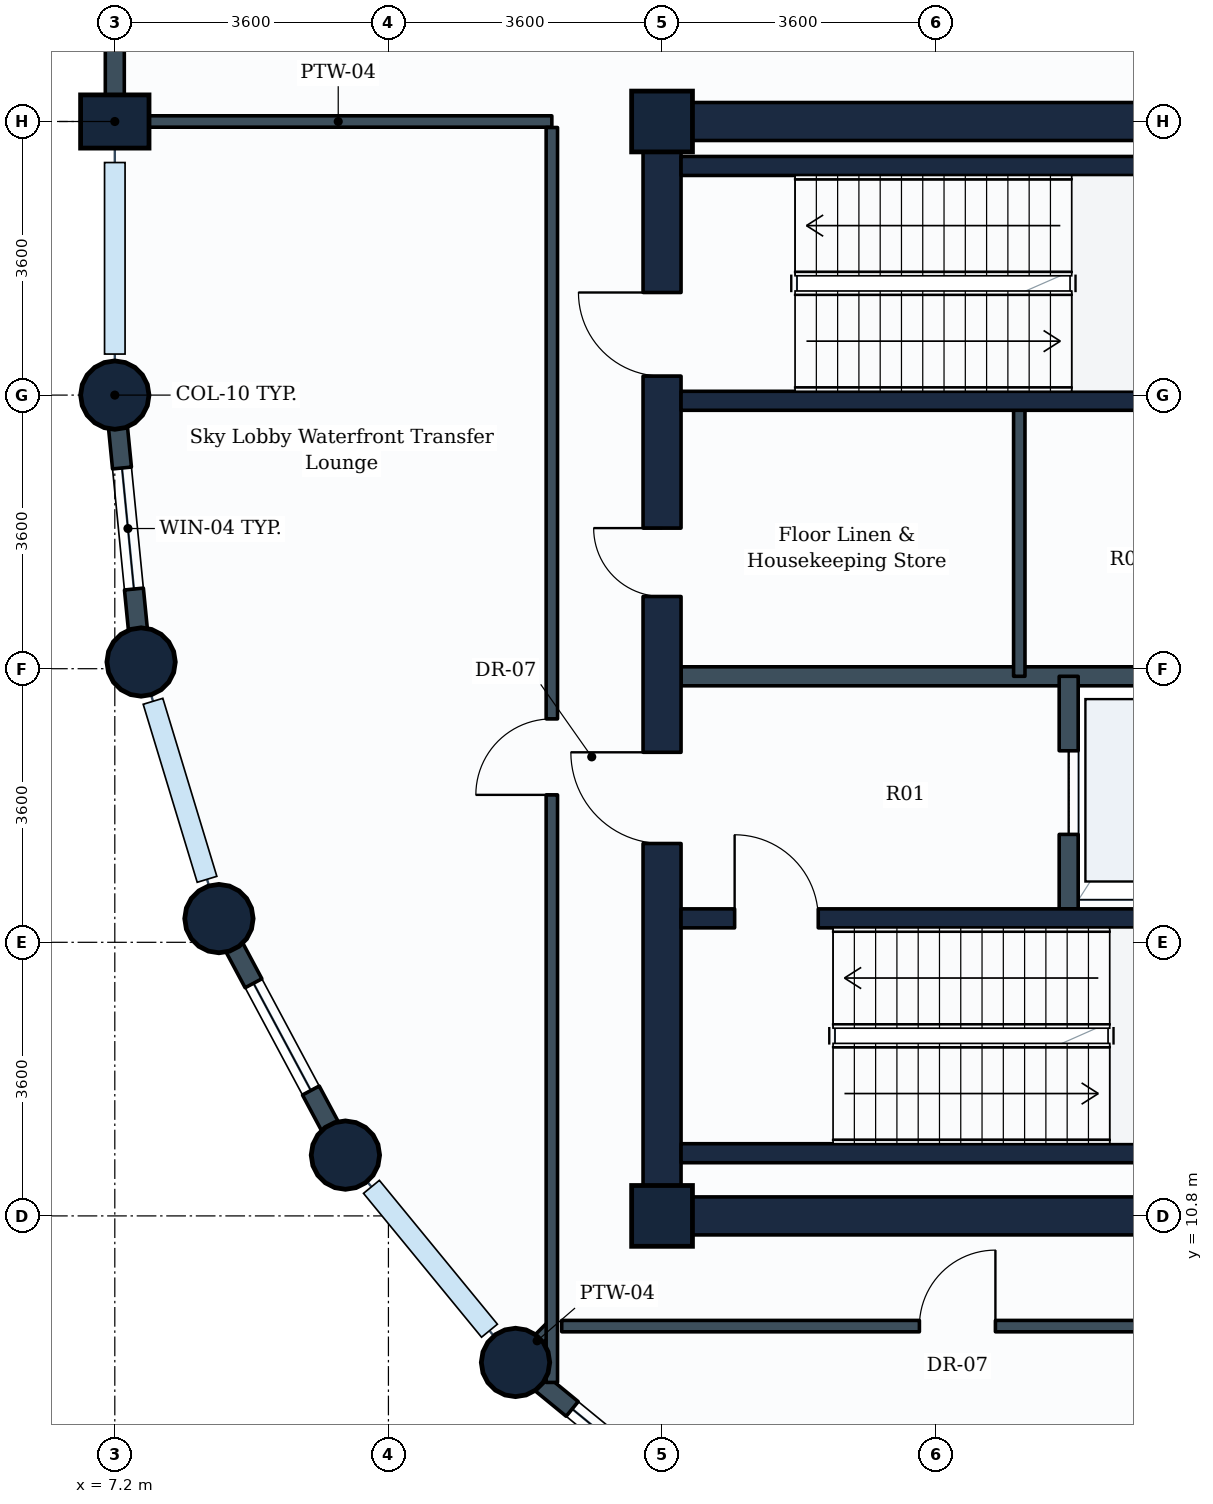
"""IFC4 building model, lengths in metres.
Left out: names, types, materials, properties, quantities, classifications, styles, units other than length and angle.
Written with IfcOpenShell. Run it as: python <this file> out.ifc"""

import sys

from ifc_helpers import new_model, si_unit, direction, frame, frame_2d, origin, origin_2d, place, context, subcontext, project, spatial, rectangle, circle, extrude, element, fill, save


model = new_model("IFC4")
c1 = context("Model", 3, precision=1e-05, world=origin(), true_north=direction((0.0, 1.0)))
c2 = subcontext(c1, "Body", "Model", "MODEL_VIEW")
j1 = project(units=[si_unit("LENGTHUNIT", "METRE"), si_unit("PLANEANGLEUNIT", "RADIAN")], contexts=[c1])
p1 = place(None, origin())
s1 = spatial("IfcSite", under=j1, at=p1, CompositionType="ELEMENT")
p2 = place(p1, origin())
s2 = spatial("IfcBuilding", under=s1, at=p2, CompositionType="ELEMENT")
p3 = place(p2, frame((0.0, 0.0, 209.0)))
s3 = spatial("IfcBuildingStorey", under=s2, at=p3, CompositionType="ELEMENT", Elevation=209.0)
p4 = place(p3, frame((7.2, 21.6, 0.0), z_axis=(0.0, 0.0, 1.0), x_axis=(1.0, 0.0, 0.0)))
e1 = element("IfcColumn", 1, at=p4, inside=s3, PredefinedType="COLUMN", context=c2, shape_type="SweptSolid", body=[
    extrude(circle(Radius=0.45, at=origin_2d()), origin(), (0.0, 0.0, 1.0), 4.8),
])
p5 = place(p3, frame((7.2, 25.2, 0.0), z_axis=(0.0, 0.0, 1.0), x_axis=(0.0, 1.0, 0.0)))
e2 = element("IfcColumn", 2, at=p5, inside=s3, PredefinedType="COLUMN", context=c2, shape_type="SweptSolid", body=[
    extrude(rectangle(XDim=0.7, YDim=0.9, at=origin_2d()), origin(), (0.0, 0.0, 1.0), 4.8),
])
for number, where, z_axis, x_axis in (
    (3, (7.546, 18.088, 0.0), (0.0, 0.0, 1.0), (1.0, 0.0, 0.0)),
    (4, (8.57, 14.712, 0.0), (0.0, 0.0, 1.0), (1.0, 0.0, 0.0)),
    (5, (10.234, 11.6, 0.0), (0.0, 0.0, 1.0), (1.0, 0.0, 0.0)),
    (6, (12.472, 8.872, 0.0), (0.0, 0.0, 1.0), (1.0, 0.0, 0.0)),
):
    element("IfcColumn", number, at=place(p3, frame(where, z_axis=z_axis, x_axis=x_axis)), inside=s3, PredefinedType="COLUMN", context=c2, shape_type="SweptSolid", body=[
        extrude(circle(Radius=0.45, at=origin_2d()), origin(), (0.0, 0.0, 1.0), 4.8),
    ])
for number, where, z_axis, x_axis in (
    (7, (14.4, 10.8, 0.0), (0.0, 0.0, 1.0), (1.0, 0.0, 0.0)),
    (8, (14.4, 25.2, 0.0), (0.0, 0.0, 1.0), (1.0, 0.0, 0.0)),
):
    element("IfcColumn", number, at=place(p3, frame(where, z_axis=z_axis, x_axis=x_axis)), inside=s3, PredefinedType="COLUMN", context=c2, shape_type="SweptSolid", body=[
        extrude(rectangle(XDim=0.8, YDim=0.8, at=origin_2d()), origin(), (0.0, 0.0, 1.0), 4.8),
    ])
p6 = place(p3, frame((7.2, 25.2, 0.0), z_axis=(0.0, 0.0, 1.0), x_axis=(0.0, 1.0, 0.0)))
e9 = element("IfcWall", 9, at=p6, inside=s3, PredefinedType="STANDARD", context=c2, shape_type="SweptSolid", body=[
    extrude(rectangle(XDim=3.6, YDim=0.25, at=frame_2d((1.8, 0.0))), origin(), (0.0, 0.0, 1.0), 3.93),
])
p7 = place(p3, frame((7.546, 18.088, 0.0), z_axis=(0.0, 0.0, 1.0), x_axis=(-0.09802417461, 0.995184033831, 0.0)))
e10 = element("IfcWall", 10, at=p7, inside=s3, PredefinedType="STANDARD", context=c2, shape_type="SweptSolid", body=[
    extrude(rectangle(XDim=3.529, YDim=0.25, at=frame_2d((1.765, 0.0))), origin(), (0.0, 0.0, 1.0), 3.93),
])
p8 = place(p7, frame((0.965, 0.0, 0.85)))
e11 = element("IfcOpeningElement", 11, at=p8, cuts=e10, PredefinedType="OPENING", context=c2, shape_type="SweptSolid", body=[
    extrude(rectangle(XDim=1.6, YDim=1.35, at=frame_2d((0.8, 0.675))), frame((0.0, 0.135, 0.0), z_axis=(0.0, -1.0, 0.0), x_axis=(1.0, 0.0, 0.0)), (0.0, 0.0, 1.0), 0.27),
])
p9 = place(p3, frame((10.234, 11.6, 0.0), z_axis=(0.0, 0.0, 1.0), x_axis=(-0.47151087309, 0.881860247748, 0.0)))
e12 = element("IfcWall", 12, at=p9, inside=s3, PredefinedType="STANDARD", context=c2, shape_type="SweptSolid", body=[
    extrude(rectangle(XDim=3.529, YDim=0.25, at=frame_2d((1.764, 0.0))), origin(), (0.0, 0.0, 1.0), 3.93),
])
p10 = place(p9, frame((0.964, 0.0, 0.85)))
e13 = element("IfcOpeningElement", 13, at=p10, cuts=e12, PredefinedType="OPENING", context=c2, shape_type="SweptSolid", body=[
    extrude(rectangle(XDim=1.6, YDim=1.35, at=frame_2d((0.8, 0.675))), frame((0.0, 0.135, 0.0), z_axis=(0.0, -1.0, 0.0), x_axis=(1.0, 0.0, 0.0)), (0.0, 0.0, 1.0), 0.27),
])
p11 = place(p3, frame((15.2, 6.634, 0.0), z_axis=(0.0, 0.0, 1.0), x_axis=(-0.773121216285, 0.634258295121, 0.0)))
e14 = element("IfcWall", 14, at=p11, inside=s3, PredefinedType="STANDARD", context=c2, shape_type="SweptSolid", body=[
    extrude(rectangle(XDim=3.529, YDim=0.25, at=frame_2d((1.764, 0.0))), origin(), (0.0, 0.0, 1.0), 3.93),
])
p12 = place(p11, frame((0.964, 0.0, 0.85)))
e15 = element("IfcOpeningElement", 15, at=p12, cuts=e14, PredefinedType="OPENING", context=c2, shape_type="SweptSolid", body=[
    extrude(rectangle(XDim=1.6, YDim=1.35, at=frame_2d((0.8, 0.675))), frame((0.0, 0.135, 0.0), z_axis=(0.0, -1.0, 0.0), x_axis=(1.0, 0.0, 0.0)), (0.0, 0.0, 1.0), 0.27),
])
p13 = place(p3, frame((14.4, 10.8, 0.0), z_axis=(0.0, 0.0, 1.0), x_axis=(1.0, 0.0, 0.0)))
e16 = element("IfcWall", 16, at=p13, inside=s3, PredefinedType="SHEAR", context=c2, shape_type="SweptSolid", body=[
    extrude(rectangle(XDim=18.0, YDim=0.5, at=frame_2d((9.0, 0.0))), origin(), (0.0, 0.0, 1.0), 4.55),
])
p14 = place(p3, frame((14.4, 25.2, 0.0), z_axis=(0.0, 0.0, 1.0), x_axis=(1.0, 0.0, 0.0)))
e17 = element("IfcWall", 17, at=p14, inside=s3, PredefinedType="SHEAR", context=c2, shape_type="SweptSolid", body=[
    extrude(rectangle(XDim=10.8, YDim=0.5, at=frame_2d((5.4, 0.0))), origin(), (0.0, 0.0, 1.0), 4.55),
])
p15 = place(p3, frame((14.4, 10.8, 0.0), z_axis=(0.0, 0.0, 1.0), x_axis=(0.0, 1.0, 0.0)))
e18 = element("IfcWall", 18, at=p15, inside=s3, PredefinedType="SHEAR", context=c2, shape_type="SweptSolid", body=[
    extrude(rectangle(XDim=14.4, YDim=0.5, at=frame_2d((7.2, 0.0))), origin(), (0.0, 0.0, 1.0), 4.55),
])
p16 = place(p15, frame((11.05, 0.0, 0.0)))
e19 = element("IfcOpeningElement", 19, at=p16, cuts=e18, PredefinedType="OPENING", context=c2, shape_type="SweptSolid", body=[
    extrude(rectangle(XDim=1.1, YDim=2.1, at=frame_2d((0.55, 1.05))), frame((0.0, 0.26, 0.0), z_axis=(0.0, -1.0, 0.0), x_axis=(1.0, 0.0, 0.0)), (0.0, 0.0, 1.0), 0.52),
])
p17 = place(p15, frame((4.9, 0.0, 0.0)))
e20 = element("IfcOpeningElement", 20, at=p17, cuts=e18, PredefinedType="OPENING", context=c2, shape_type="SweptSolid", body=[
    extrude(rectangle(XDim=1.2, YDim=2.1, at=frame_2d((0.6, 1.05))), frame((0.0, 0.26, 0.0), z_axis=(0.0, -1.0, 0.0), x_axis=(1.0, 0.0, 0.0)), (0.0, 0.0, 1.0), 0.52),
])
p18 = place(p15, frame((8.15, 0.0, 0.0)))
e21 = element("IfcOpeningElement", 21, at=p18, cuts=e18, PredefinedType="OPENING", context=c2, shape_type="SweptSolid", body=[
    extrude(rectangle(XDim=0.9, YDim=2.1, at=frame_2d((0.45, 1.05))), frame((0.0, 0.26, 0.0), z_axis=(0.0, -1.0, 0.0), x_axis=(1.0, 0.0, 0.0)), (0.0, 0.0, 1.0), 0.52),
])
p19 = place(p3, frame((14.65, 11.625, 0.0), z_axis=(0.0, 0.0, 1.0), x_axis=(1.0, 0.0, 0.0)))
e22 = element("IfcWall", 22, at=p19, inside=s3, PredefinedType="SHEAR", context=c2, shape_type="SweptSolid", body=[
    extrude(rectangle(XDim=8.7, YDim=0.25, at=frame_2d((4.35, 0.0))), origin(), (0.0, 0.0, 1.0), 4.55),
])
p20 = place(p3, frame((14.65, 14.715, 0.0), z_axis=(0.0, 0.0, 1.0), x_axis=(1.0, 0.0, 0.0)))
e23 = element("IfcWall", 23, at=p20, inside=s3, PredefinedType="SHEAR", context=c2, shape_type="SweptSolid", body=[
    extrude(rectangle(XDim=8.7, YDim=0.25, at=frame_2d((4.35, 0.0))), origin(), (0.0, 0.0, 1.0), 4.55),
])
p21 = place(p20, frame((0.705, 0.0, 0.0)))
e24 = element("IfcOpeningElement", 24, at=p21, cuts=e23, PredefinedType="OPENING", context=c2, shape_type="SweptSolid", body=[
    extrude(rectangle(XDim=1.1, YDim=2.1, at=frame_2d((0.55, 1.05))), frame((0.0, 0.135, 0.0), z_axis=(0.0, -1.0, 0.0), x_axis=(1.0, 0.0, 0.0)), (0.0, 0.0, 1.0), 0.27),
])
for number, where, z_axis, x_axis in (
    (25, (14.65, 21.525, 0.0), (0.0, 0.0, 1.0), (1.0, 0.0, 0.0)),
    (26, (14.65, 24.615, 0.0), (0.0, 0.0, 1.0), (1.0, 0.0, 0.0)),
):
    element("IfcWall", number, at=place(p3, frame(where, z_axis=z_axis, x_axis=x_axis)), inside=s3, PredefinedType="SHEAR", context=c2, shape_type="SweptSolid", body=[
        extrude(rectangle(XDim=8.25, YDim=0.25, at=frame_2d((4.125, 0.0))), origin(), (0.0, 0.0, 1.0), 4.55),
    ])
p22 = place(p3, frame((14.65, 17.9, 0.0), z_axis=(0.0, 0.0, 1.0), x_axis=(1.0, 0.0, 0.0)))
e27 = element("IfcWall", 27, at=p22, inside=s3, PredefinedType="PARTITIONING", context=c2, shape_type="SweptSolid", body=[
    extrude(rectangle(XDim=7.15, YDim=0.25, at=frame_2d((3.575, 0.0))), origin(), (0.0, 0.0, 1.0), 4.535),
])
p23 = place(p3, frame((19.75, 14.84, 0.0), z_axis=(0.0, 0.0, 1.0), x_axis=(0.0, 1.0, 0.0)))
e28 = element("IfcWall", 28, at=p23, inside=s3, PredefinedType="PARTITIONING", context=c2, shape_type="SweptSolid", body=[
    extrude(rectangle(XDim=3.06, YDim=0.25, at=frame_2d((1.53, 0.0))), origin(), (0.0, 0.0, 1.0), 4.535),
])
p24 = place(p23, frame((0.98, 0.0, 0.0)))
e29 = element("IfcOpeningElement", 29, at=p24, cuts=e28, PredefinedType="OPENING", context=c2, shape_type="SweptSolid", body=[
    extrude(rectangle(XDim=1.1, YDim=2.1, at=frame_2d((0.55, 1.05))), frame((0.0, 0.135, 0.0), z_axis=(0.0, -1.0, 0.0), x_axis=(1.0, 0.0, 0.0)), (0.0, 0.0, 1.0), 0.27),
])
p25 = place(p3, frame((19.1, 17.9, 0.0), z_axis=(0.0, 0.0, 1.0), x_axis=(0.0, 1.0, 0.0)))
e30 = element("IfcWall", 30, at=p25, inside=s3, PredefinedType="PARTITIONING", context=c2, shape_type="SweptSolid", body=[
    extrude(rectangle(XDim=3.625, YDim=0.15, at=frame_2d((1.812, 0.0))), origin(), (0.0, 0.0, 1.0), 4.535),
])
p26 = place(p3, frame((7.329, 25.2, 0.0), z_axis=(0.0, 0.0, 1.0), x_axis=(1.0, 0.0, 0.0)))
e31 = element("IfcWall", 31, at=p26, inside=s3, PredefinedType="PARTITIONING", context=c2, shape_type="SweptSolid", body=[
    extrude(rectangle(XDim=5.621, YDim=0.15, at=frame_2d((2.811, 0.0))), origin(), (0.0, 0.0, 1.0), 4.535),
])
p27 = place(p3, frame((12.95, 9.35, 0.0), z_axis=(0.0, 0.0, 1.0), x_axis=(-0.706883613527, -0.707329878435, 0.0)))
e32 = element("IfcWall", 32, at=p27, inside=s3, PredefinedType="PARTITIONING", context=c2, shape_type="SweptSolid", body=[
    extrude(rectangle(XDim=0.547, YDim=0.15, at=frame_2d((0.273, 0.0))), origin(), (0.0, 0.0, 1.0), 4.26),
])
p28 = place(p3, frame((12.95, 8.609, 0.0), z_axis=(0.0, 0.0, 1.0), x_axis=(0.0, 1.0, 0.0)))
e33 = element("IfcWall", 33, at=p28, inside=s3, PredefinedType="PARTITIONING", context=c2, shape_type="SweptSolid", body=[
    extrude(rectangle(XDim=16.512, YDim=0.15, at=frame_2d((8.256, 0.0))), origin(), (0.0, 0.0, 1.0), 3.93),
])
p29 = place(p28, frame((7.731, 0.0, 0.0)))
e34 = element("IfcOpeningElement", 34, at=p29, cuts=e33, PredefinedType="OPENING", context=c2, shape_type="SweptSolid", body=[
    extrude(rectangle(XDim=1.0, YDim=2.1, at=frame_2d((0.5, 1.05))), frame((0.0, 0.085, 0.0), z_axis=(0.0, -1.0, 0.0), x_axis=(1.0, 0.0, 0.0)), (0.0, 0.0, 1.0), 0.17),
])
p30 = place(p3, frame((13.08, 9.35, 0.0), z_axis=(0.0, 0.0, 1.0), x_axis=(1.0, 0.0, 0.0)))
e35 = element("IfcWall", 35, at=p30, inside=s3, PredefinedType="PARTITIONING", context=c2, shape_type="SweptSolid", body=[
    extrude(rectangle(XDim=15.641, YDim=0.15, at=frame_2d((7.82, 0.0))), origin(), (0.0, 0.0, 1.0), 4.22),
])
p31 = place(p30, frame((4.706, 0.0, 0.0)))
e36 = element("IfcOpeningElement", 36, at=p31, cuts=e35, PredefinedType="OPENING", context=c2, shape_type="SweptSolid", body=[
    extrude(rectangle(XDim=1.0, YDim=2.1, at=frame_2d((0.5, 1.05))), frame((0.0, 0.085, 0.0), z_axis=(0.0, -1.0, 0.0), x_axis=(1.0, 0.0, 0.0)), (0.0, 0.0, 1.0), 0.17),
])
p32 = place(p8, origin())
e37 = element("IfcWindow", 37, at=p32, inside=s3, PartitioningType="SINGLE_PANEL", PredefinedType="WINDOW", context=c2, shape_type="SweptSolid", body=[
    extrude(rectangle(XDim=1.6, YDim=1.35, at=frame_2d((0.8, 0.675))), frame((0.0, 0.03, 0.0), z_axis=(0.0, -1.0, 0.0), x_axis=(1.0, 0.0, 0.0)), (0.0, 0.0, 1.0), 0.06),
])
fill(e11, e37)
p33 = place(p10, origin())
e38 = element("IfcWindow", 38, at=p33, inside=s3, PartitioningType="SINGLE_PANEL", PredefinedType="WINDOW", context=c2, shape_type="SweptSolid", body=[
    extrude(rectangle(XDim=1.6, YDim=1.35, at=frame_2d((0.8, 0.675))), frame((0.0, 0.03, 0.0), z_axis=(0.0, -1.0, 0.0), x_axis=(1.0, 0.0, 0.0)), (0.0, 0.0, 1.0), 0.06),
])
fill(e13, e38)
p34 = place(p12, origin())
e39 = element("IfcWindow", 39, at=p34, inside=s3, PartitioningType="SINGLE_PANEL", PredefinedType="WINDOW", context=c2, shape_type="SweptSolid", body=[
    extrude(rectangle(XDim=1.6, YDim=1.35, at=frame_2d((0.8, 0.675))), frame((0.0, 0.03, 0.0), z_axis=(0.0, -1.0, 0.0), x_axis=(1.0, 0.0, 0.0)), (0.0, 0.0, 1.0), 0.06),
])
fill(e15, e39)
p35 = place(p21, origin())
e40 = element("IfcDoor", 40, at=p35, inside=s3, OperationType="SINGLE_SWING_LEFT", PredefinedType="DOOR", context=c2, shape_type="SweptSolid", body=[
    extrude(rectangle(XDim=1.1, YDim=2.1, at=frame_2d((0.55, 1.05))), frame((0.0, 0.025, 0.0), z_axis=(0.0, -1.0, 0.0), x_axis=(1.0, 0.0, 0.0)), (0.0, 0.0, 1.0), 0.05),
])
fill(e24, e40)
p36 = place(p16, origin())
e41 = element("IfcDoor", 41, at=p36, inside=s3, OperationType="SINGLE_SWING_RIGHT", PredefinedType="DOOR", context=c2, shape_type="SweptSolid", body=[
    extrude(rectangle(XDim=1.1, YDim=2.1, at=frame_2d((0.55, 1.05))), frame((0.0, 0.025, 0.0), z_axis=(0.0, -1.0, 0.0), x_axis=(1.0, 0.0, 0.0)), (0.0, 0.0, 1.0), 0.05),
])
fill(e19, e41)
p37 = place(p24, origin())
e42 = element("IfcDoor", 42, at=p37, inside=s3, OperationType="SLIDING_TO_LEFT", PredefinedType="DOOR", context=c2, shape_type="SweptSolid", body=[
    extrude(rectangle(XDim=1.1, YDim=2.1, at=frame_2d((0.55, 1.05))), frame((0.0, 0.025, 0.0), z_axis=(0.0, -1.0, 0.0), x_axis=(1.0, 0.0, 0.0)), (0.0, 0.0, 1.0), 0.05),
])
fill(e29, e42)
p38 = place(p17, origin())
e43 = element("IfcDoor", 43, at=p38, inside=s3, OperationType="SINGLE_SWING_RIGHT", PredefinedType="DOOR", context=c2, shape_type="SweptSolid", body=[
    extrude(rectangle(XDim=1.2, YDim=2.1, at=frame_2d((0.6, 1.05))), frame((0.0, 0.025, 0.0), z_axis=(0.0, -1.0, 0.0), x_axis=(1.0, 0.0, 0.0)), (0.0, 0.0, 1.0), 0.05),
])
fill(e20, e43)
p39 = place(p18, origin())
e44 = element("IfcDoor", 44, at=p39, inside=s3, OperationType="SINGLE_SWING_RIGHT", PredefinedType="DOOR", context=c2, shape_type="SweptSolid", body=[
    extrude(rectangle(XDim=0.9, YDim=2.1, at=frame_2d((0.45, 1.05))), frame((0.0, 0.025, 0.0), z_axis=(0.0, -1.0, 0.0), x_axis=(1.0, 0.0, 0.0)), (0.0, 0.0, 1.0), 0.05),
])
fill(e21, e44)
p40 = place(p29, origin())
e45 = element("IfcDoor", 45, at=p40, inside=s3, OperationType="SINGLE_SWING_LEFT", PredefinedType="DOOR", context=c2, shape_type="SweptSolid", body=[
    extrude(rectangle(XDim=1.0, YDim=2.1, at=frame_2d((0.5, 1.05))), frame((0.0, 0.025, 0.0), z_axis=(0.0, -1.0, 0.0), x_axis=(1.0, 0.0, 0.0)), (0.0, 0.0, 1.0), 0.05),
])
fill(e34, e45)
p41 = place(p31, origin())
e46 = element("IfcDoor", 46, at=p41, inside=s3, OperationType="SINGLE_SWING_RIGHT", PredefinedType="DOOR", context=c2, shape_type="SweptSolid", body=[
    extrude(rectangle(XDim=1.0, YDim=2.1, at=frame_2d((0.5, 1.05))), frame((0.0, 0.025, 0.0), z_axis=(0.0, -1.0, 0.0), x_axis=(1.0, 0.0, 0.0)), (0.0, 0.0, 1.0), 0.05),
])
fill(e36, e46)
save(model, sys.argv[1])
